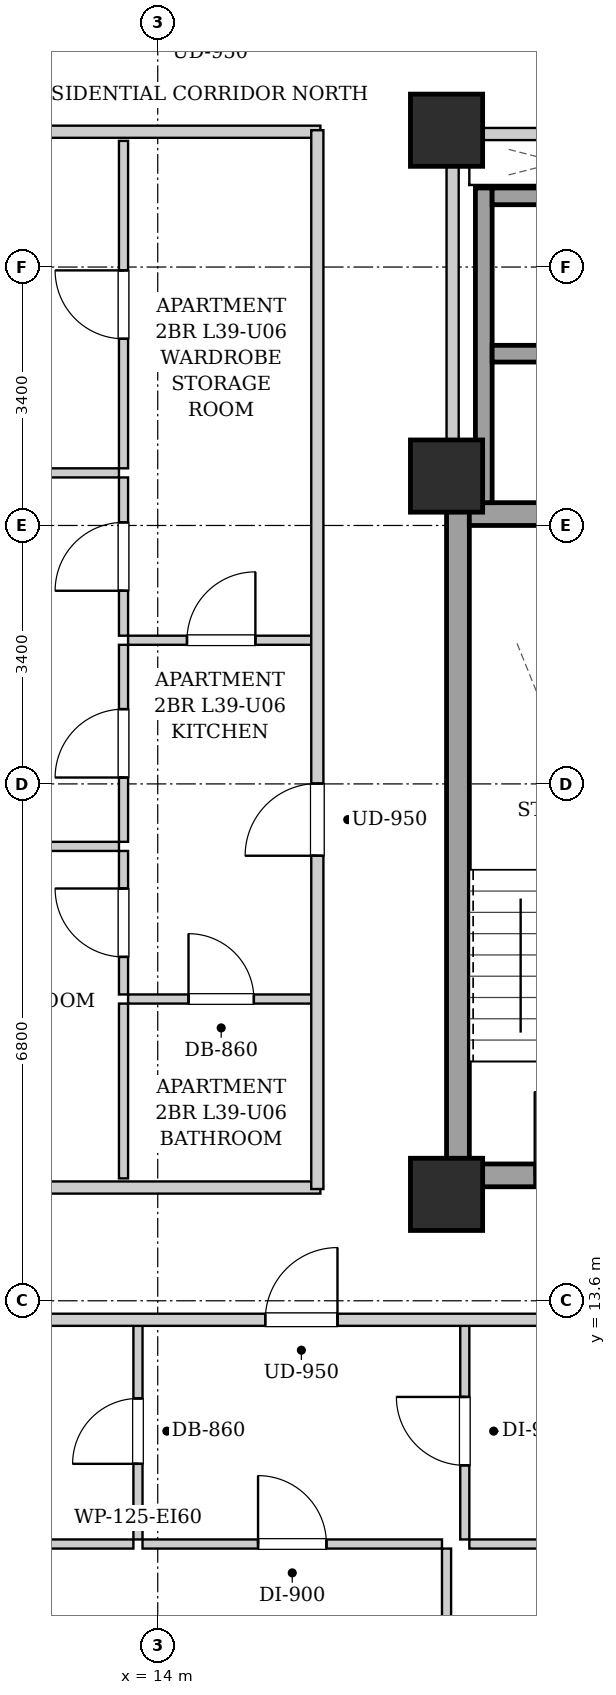
"""IFC4 building model, lengths in metres.
Left out: names, types, materials, properties, quantities, classifications, styles, units other than length and angle.
Written with IfcOpenShell. Run it as: python <this file> out.ifc"""

import sys

from ifc_helpers import new_model, si_unit, direction, frame, frame_2d, origin, origin_2d, place, context, subcontext, project, spatial, rectangle, extrude, element, fill, save


model = new_model("IFC4")
c1 = context("Model", 3, precision=1e-05, world=origin(), true_north=direction((0.0, 1.0)))
c2 = subcontext(c1, "Body", "Model", "MODEL_VIEW")
j1 = project(units=[si_unit("LENGTHUNIT", "METRE"), si_unit("PLANEANGLEUNIT", "RADIAN")], contexts=[c1])
p1 = place(None, origin())
s1 = spatial("IfcSite", under=j1, at=p1, CompositionType="ELEMENT")
p2 = place(p1, origin())
s2 = spatial("IfcBuilding", under=s1, at=p2, CompositionType="ELEMENT")
p3 = place(p2, frame((0.0, 0.0, 137.4)))
s3 = spatial("IfcBuildingStorey", under=s2, at=p3, CompositionType="ELEMENT", Elevation=137.4)
for number, where, z_axis, x_axis in (
    (1, (17.8, 15.0, 0.0), (0.0, 0.0, 1.0), (1.0, 0.0, 0.0)),
    (2, (17.8, 29.0, 0.0), (0.0, 0.0, 1.0), (1.0, 0.0, 0.0)),
    (3, (17.8, 24.45, 0.0), (0.0, 0.0, 1.0), (1.0, 0.0, 0.0)),
):
    element("IfcColumn", number, at=place(p3, frame(where, z_axis=z_axis, x_axis=x_axis)), inside=s3, PredefinedType="COLUMN", context=c2, shape_type="SweptSolid", body=[
        extrude(rectangle(XDim=0.95, YDim=0.95, at=origin_2d()), origin(), (0.0, 0.0, 1.0), 3.25),
    ])
p4 = place(p3, frame((17.95, 15.1, 0.0), z_axis=(0.0, 0.0, 1.0), x_axis=(0.0, 1.0, 0.0)))
e4 = element("IfcWall", 4, at=p4, inside=s3, PredefinedType="SHEAR", context=c2, shape_type="SweptSolid", body=[
    extrude(rectangle(XDim=9.0, YDim=0.3, at=frame_2d((4.5, 0.0))), origin(), (0.0, 0.0, 1.0), 2.99),
])
p5 = place(p3, frame((18.1, 23.95, 0.0), z_axis=(0.0, 0.0, 1.0), x_axis=(1.0, 0.0, 0.0)))
e5 = element("IfcWall", 5, at=p5, inside=s3, PredefinedType="SHEAR", context=c2, shape_type="SweptSolid", body=[
    extrude(rectangle(XDim=2.85, YDim=0.3, at=frame_2d((1.425, 0.0))), origin(), (0.0, 0.0, 1.0), 2.99),
])
p6 = place(p3, frame((18.1, 15.25, 0.0), z_axis=(0.0, 0.0, 1.0), x_axis=(1.0, 0.0, 0.0)))
e6 = element("IfcWall", 6, at=p6, inside=s3, PredefinedType="SHEAR", context=c2, shape_type="SweptSolid", body=[
    extrude(rectangle(XDim=2.85, YDim=0.3, at=frame_2d((1.425, 0.0))), origin(), (0.0, 0.0, 1.0), 2.99),
])
p7 = place(p6, frame((0.86, 0.0, 0.0)))
e7 = element("IfcOpeningElement", 7, at=p7, cuts=e6, PredefinedType="OPENING", context=c2, shape_type="SweptSolid", body=[
    extrude(rectangle(XDim=1.1, YDim=2.05, at=frame_2d((0.55, 1.025))), frame((0.0, 0.16, 0.0), z_axis=(0.0, -1.0, 0.0), x_axis=(1.0, 0.0, 0.0)), (0.0, 0.0, 1.0), 0.32),
])
p8 = place(p3, frame((18.29, 24.1, 0.0), z_axis=(0.0, 0.0, 1.0), x_axis=(0.0, 1.0, 0.0)))
e8 = element("IfcWall", 8, at=p8, inside=s3, PredefinedType="SHEAR", context=c2, shape_type="SweptSolid", body=[
    extrude(rectangle(XDim=4.14, YDim=0.22, at=frame_2d((2.07, 0.0))), origin(), (0.0, 0.0, 1.0), 2.99),
])
for number, where, z_axis, x_axis in (
    (9, (18.4, 26.06, 0.0), (0.0, 0.0, 1.0), (1.0, 0.0, 0.0)),
    (10, (18.4, 28.13, 0.0), (0.0, 0.0, 1.0), (1.0, 0.0, 0.0)),
):
    element("IfcWall", number, at=place(p3, frame(where, z_axis=z_axis, x_axis=x_axis)), inside=s3, PredefinedType="SHEAR", context=c2, shape_type="SweptSolid", body=[
        extrude(rectangle(XDim=1.9, YDim=0.22, at=frame_2d((0.95, 0.0))), origin(), (0.0, 0.0, 1.0), 2.99),
    ])
p9 = place(p3, frame((17.88, 24.12, 0.0), z_axis=(0.0, 0.0, 1.0), x_axis=(0.0, 1.0, 0.0)))
e11 = element("IfcWall", 11, at=p9, inside=s3, PredefinedType="PARTITIONING", context=c2, shape_type="SweptSolid", body=[
    extrude(rectangle(XDim=4.76, YDim=0.16, at=frame_2d((2.38, 0.0))), origin(), (0.0, 0.0, 1.0), 2.325),
])
p10 = place(p3, frame((17.96, 28.95, 0.0), z_axis=(0.0, 0.0, 1.0), x_axis=(1.0, 0.0, 0.0)))
e12 = element("IfcWall", 12, at=p10, inside=s3, PredefinedType="PARTITIONING", context=c2, shape_type="SweptSolid", body=[
    extrude(rectangle(XDim=4.29, YDim=0.16, at=frame_2d((2.145, 0.0))), origin(), (0.0, 0.0, 1.0), 2.426),
])
p11 = place(p10, frame((1.695, 0.0, 0.0)))
e13 = element("IfcOpeningElement", 13, at=p11, cuts=e12, PredefinedType="OPENING", context=c2, shape_type="SweptSolid", body=[
    extrude(rectangle(XDim=0.86, YDim=2.05, at=frame_2d((0.43, 1.025))), frame((0.0, 0.09, 0.0), z_axis=(0.0, -1.0, 0.0), x_axis=(1.0, 0.0, 0.0)), (0.0, 0.0, 1.0), 0.18),
])
for number, where, z_axis, x_axis in (
    (14, (7.78, 15.09, 0.0), (0.0, 0.0, 1.0), (1.0, 0.0, 0.0)),
    (15, (7.78, 28.98, 0.0), (0.0, 0.0, 1.0), (1.0, 0.0, 0.0)),
):
    element("IfcWall", number, at=place(p3, frame(where, z_axis=z_axis, x_axis=x_axis)), inside=s3, PredefinedType="PARTITIONING", context=c2, shape_type="SweptSolid", body=[
        extrude(rectangle(XDim=8.36, YDim=0.16, at=frame_2d((4.18, 0.0))), origin(), (0.0, 0.0, 1.0), 2.426),
    ])
p12 = place(p3, frame((13.74, 10.46, 0.0), z_axis=(0.0, 0.0, 1.0), x_axis=(0.0, 1.0, 0.0)))
e16 = element("IfcWall", 16, at=p12, inside=s3, PredefinedType="PARTITIONING", context=c2, shape_type="SweptSolid", body=[
    extrude(rectangle(XDim=2.85, YDim=0.12, at=frame_2d((1.425, 0.0))), origin(), (0.0, 0.0, 1.0), 2.99),
])
p13 = place(p12, frame((0.995, 0.0, 0.0)))
e17 = element("IfcOpeningElement", 17, at=p13, cuts=e16, PredefinedType="OPENING", context=c2, shape_type="SweptSolid", body=[
    extrude(rectangle(XDim=0.86, YDim=2.05, at=frame_2d((0.43, 1.025))), frame((0.0, 0.07, 0.0), z_axis=(0.0, -1.0, 0.0), x_axis=(1.0, 0.0, 0.0)), (0.0, 0.0, 1.0), 0.14),
])
p14 = place(p3, frame((11.28, 10.4, 0.0), z_axis=(0.0, 0.0, 1.0), x_axis=(1.0, 0.0, 0.0)))
e18 = element("IfcWall", 18, at=p14, inside=s3, PredefinedType="PARTITIONING", context=c2, shape_type="SweptSolid", body=[
    extrude(rectangle(XDim=2.4, YDim=0.12, at=frame_2d((1.2, 0.0))), origin(), (0.0, 0.0, 1.0), 2.99),
])
p15 = place(p3, frame((18.04, 10.46, 0.0), z_axis=(0.0, 0.0, 1.0), x_axis=(0.0, 1.0, 0.0)))
e19 = element("IfcWall", 19, at=p15, inside=s3, PredefinedType="PARTITIONING", context=c2, shape_type="SweptSolid", body=[
    extrude(rectangle(XDim=2.85, YDim=0.12, at=frame_2d((1.425, 0.0))), origin(), (0.0, 0.0, 1.0), 2.99),
])
p16 = place(p15, frame((0.975, 0.0, 0.0)))
e20 = element("IfcOpeningElement", 20, at=p16, cuts=e19, PredefinedType="OPENING", context=c2, shape_type="SweptSolid", body=[
    extrude(rectangle(XDim=0.9, YDim=2.05, at=frame_2d((0.45, 1.025))), frame((0.0, 0.07, 0.0), z_axis=(0.0, -1.0, 0.0), x_axis=(1.0, 0.0, 0.0)), (0.0, 0.0, 1.0), 0.14),
])
p17 = place(p3, frame((13.8, 10.4, 0.0), z_axis=(0.0, 0.0, 1.0), x_axis=(1.0, 0.0, 0.0)))
e21 = element("IfcWall", 21, at=p17, inside=s3, PredefinedType="PARTITIONING", context=c2, shape_type="SweptSolid", body=[
    extrude(rectangle(XDim=3.94, YDim=0.12, at=frame_2d((1.97, 0.0))), origin(), (0.0, 0.0, 1.0), 2.99),
])
p18 = place(p17, frame((1.52, 0.0, 0.0)))
e22 = element("IfcOpeningElement", 22, at=p18, cuts=e21, PredefinedType="OPENING", context=c2, shape_type="SweptSolid", body=[
    extrude(rectangle(XDim=0.9, YDim=2.05, at=frame_2d((0.45, 1.025))), frame((0.0, 0.07, 0.0), z_axis=(0.0, -1.0, 0.0), x_axis=(1.0, 0.0, 0.0)), (0.0, 0.0, 1.0), 0.14),
])
p19 = place(p3, frame((18.1, 10.4, 0.0), z_axis=(0.0, 0.0, 1.0), x_axis=(1.0, 0.0, 0.0)))
e23 = element("IfcWall", 23, at=p19, inside=s3, PredefinedType="PARTITIONING", context=c2, shape_type="SweptSolid", body=[
    extrude(rectangle(XDim=3.708, YDim=0.12, at=frame_2d((1.854, 0.0))), origin(), (0.0, 0.0, 1.0), 2.99),
])
p20 = place(p19, frame((1.404, 0.0, 0.0)))
e24 = element("IfcOpeningElement", 24, at=p20, cuts=e23, PredefinedType="OPENING", context=c2, shape_type="SweptSolid", body=[
    extrude(rectangle(XDim=0.9, YDim=2.05, at=frame_2d((0.45, 1.025))), frame((0.0, 0.07, 0.0), z_axis=(0.0, -1.0, 0.0), x_axis=(1.0, 0.0, 0.0)), (0.0, 0.0, 1.0), 0.14),
])
p21 = place(p3, frame((17.8, 4.08, 0.0), z_axis=(0.0, 0.0, 1.0), x_axis=(0.0, 1.0, 0.0)))
e25 = element("IfcWall", 25, at=p21, inside=s3, PredefinedType="PARTITIONING", context=c2, shape_type="SweptSolid", body=[
    extrude(rectangle(XDim=6.26, YDim=0.12, at=frame_2d((3.13, 0.0))), origin(), (0.0, 0.0, 1.0), 2.426),
])
p22 = place(p21, frame((2.665, 0.0, 0.0)))
e26 = element("IfcOpeningElement", 26, at=p22, cuts=e25, PredefinedType="OPENING", context=c2, shape_type="SweptSolid", body=[
    extrude(rectangle(XDim=0.9, YDim=2.05, at=frame_2d((0.45, 1.025))), frame((0.0, 0.07, 0.0), z_axis=(0.0, -1.0, 0.0), x_axis=(1.0, 0.0, 0.0)), (0.0, 0.0, 1.0), 0.14),
])
p23 = place(p3, frame((13.61, 22.29, 0.0), z_axis=(0.0, 0.0, 1.0), x_axis=(1.0, 0.0, 0.0)))
e27 = element("IfcWall", 27, at=p23, inside=s3, PredefinedType="PARTITIONING", context=c2, shape_type="SweptSolid", body=[
    extrude(rectangle(XDim=2.45, YDim=0.12, at=frame_2d((1.225, 0.0))), origin(), (0.0, 0.0, 1.0), 2.99),
])
p24 = place(p23, frame((0.775, 0.0, 0.0)))
e28 = element("IfcOpeningElement", 28, at=p24, cuts=e27, PredefinedType="OPENING", context=c2, shape_type="SweptSolid", body=[
    extrude(rectangle(XDim=0.9, YDim=2.05, at=frame_2d((0.45, 1.025))), frame((0.0, 0.07, 0.0), z_axis=(0.0, -1.0, 0.0), x_axis=(1.0, 0.0, 0.0)), (0.0, 0.0, 1.0), 0.14),
])
p25 = place(p3, frame((13.55, 22.35, 0.0), z_axis=(0.0, 0.0, 1.0), x_axis=(0.0, 1.0, 0.0)))
e29 = element("IfcWall", 29, at=p25, inside=s3, PredefinedType="PARTITIONING", context=c2, shape_type="SweptSolid", body=[
    extrude(rectangle(XDim=2.082, YDim=0.12, at=frame_2d((1.041, 0.0))), origin(), (0.0, 0.0, 1.0), 2.99),
])
p26 = place(p25, frame((0.591, 0.0, 0.0)))
e30 = element("IfcOpeningElement", 30, at=p26, cuts=e29, PredefinedType="OPENING", context=c2, shape_type="SweptSolid", body=[
    extrude(rectangle(XDim=0.9, YDim=2.05, at=frame_2d((0.45, 1.025))), frame((0.0, 0.07, 0.0), z_axis=(0.0, -1.0, 0.0), x_axis=(1.0, 0.0, 0.0)), (0.0, 0.0, 1.0), 0.14),
])
p27 = place(p3, frame((13.55, 24.552, 0.0), z_axis=(0.0, 0.0, 1.0), x_axis=(0.0, 1.0, 0.0)))
e31 = element("IfcWall", 31, at=p27, inside=s3, PredefinedType="PARTITIONING", context=c2, shape_type="SweptSolid", body=[
    extrude(rectangle(XDim=4.308, YDim=0.12, at=frame_2d((2.154, 0.0))), origin(), (0.0, 0.0, 1.0), 2.99),
])
p28 = place(p27, frame((1.704, 0.0, 0.0)))
e32 = element("IfcOpeningElement", 32, at=p28, cuts=e31, PredefinedType="OPENING", context=c2, shape_type="SweptSolid", body=[
    extrude(rectangle(XDim=0.9, YDim=2.05, at=frame_2d((0.45, 1.025))), frame((0.0, 0.07, 0.0), z_axis=(0.0, -1.0, 0.0), x_axis=(1.0, 0.0, 0.0)), (0.0, 0.0, 1.0), 0.14),
])
p29 = place(p3, frame((13.61, 17.57, 0.0), z_axis=(0.0, 0.0, 1.0), x_axis=(1.0, 0.0, 0.0)))
e33 = element("IfcWall", 33, at=p29, inside=s3, PredefinedType="PARTITIONING", context=c2, shape_type="SweptSolid", body=[
    extrude(rectangle(XDim=2.45, YDim=0.12, at=frame_2d((1.225, 0.0))), origin(), (0.0, 0.0, 1.0), 2.99),
])
p30 = place(p29, frame((0.795, 0.0, 0.0)))
e34 = element("IfcOpeningElement", 34, at=p30, cuts=e33, PredefinedType="OPENING", context=c2, shape_type="SweptSolid", body=[
    extrude(rectangle(XDim=0.86, YDim=2.05, at=frame_2d((0.43, 1.025))), frame((0.0, 0.07, 0.0), z_axis=(0.0, -1.0, 0.0), x_axis=(1.0, 0.0, 0.0)), (0.0, 0.0, 1.0), 0.14),
])
p31 = place(p3, frame((13.55, 15.21, 0.0), z_axis=(0.0, 0.0, 1.0), x_axis=(0.0, 1.0, 0.0)))
e35 = element("IfcWall", 35, at=p31, inside=s3, PredefinedType="PARTITIONING", context=c2, shape_type="SweptSolid", body=[
    extrude(rectangle(XDim=2.3, YDim=0.12, at=frame_2d((1.15, 0.0))), origin(), (0.0, 0.0, 1.0), 2.99),
])
p32 = place(p3, frame((13.55, 17.63, 0.0), z_axis=(0.0, 0.0, 1.0), x_axis=(0.0, 1.0, 0.0)))
e36 = element("IfcWall", 36, at=p32, inside=s3, PredefinedType="PARTITIONING", context=c2, shape_type="SweptSolid", body=[
    extrude(rectangle(XDim=1.888, YDim=0.12, at=frame_2d((0.944, 0.0))), origin(), (0.0, 0.0, 1.0), 2.99),
])
p33 = place(p32, frame((0.494, 0.0, 0.0)))
e37 = element("IfcOpeningElement", 37, at=p33, cuts=e36, PredefinedType="OPENING", context=c2, shape_type="SweptSolid", body=[
    extrude(rectangle(XDim=0.9, YDim=2.05, at=frame_2d((0.45, 1.025))), frame((0.0, 0.07, 0.0), z_axis=(0.0, -1.0, 0.0), x_axis=(1.0, 0.0, 0.0)), (0.0, 0.0, 1.0), 0.14),
])
p34 = place(p3, frame((13.55, 19.638, 0.0), z_axis=(0.0, 0.0, 1.0), x_axis=(0.0, 1.0, 0.0)))
e38 = element("IfcWall", 38, at=p34, inside=s3, PredefinedType="PARTITIONING", context=c2, shape_type="SweptSolid", body=[
    extrude(rectangle(XDim=2.592, YDim=0.12, at=frame_2d((1.296, 0.0))), origin(), (0.0, 0.0, 1.0), 2.99),
])
p35 = place(p34, frame((0.846, 0.0, 0.0)))
e39 = element("IfcOpeningElement", 39, at=p35, cuts=e38, PredefinedType="OPENING", context=c2, shape_type="SweptSolid", body=[
    extrude(rectangle(XDim=0.9, YDim=2.05, at=frame_2d((0.45, 1.025))), frame((0.0, 0.07, 0.0), z_axis=(0.0, -1.0, 0.0), x_axis=(1.0, 0.0, 0.0)), (0.0, 0.0, 1.0), 0.14),
])
p36 = place(p3, frame((7.78, 19.578, 0.0), z_axis=(0.0, 0.0, 1.0), x_axis=(1.0, 0.0, 0.0)))
e40 = element("IfcWall", 40, at=p36, inside=s3, PredefinedType="PARTITIONING", context=c2, shape_type="SweptSolid", body=[
    extrude(rectangle(XDim=5.71, YDim=0.12, at=frame_2d((2.855, 0.0))), origin(), (0.0, 0.0, 1.0), 2.99),
])
p37 = place(p36, frame((2.39, 0.0, 0.0)))
e41 = element("IfcOpeningElement", 41, at=p37, cuts=e40, PredefinedType="OPENING", context=c2, shape_type="SweptSolid", body=[
    extrude(rectangle(XDim=0.9, YDim=2.05, at=frame_2d((0.45, 1.025))), frame((0.0, 0.07, 0.0), z_axis=(0.0, -1.0, 0.0), x_axis=(1.0, 0.0, 0.0)), (0.0, 0.0, 1.0), 0.14),
])
p38 = place(p3, frame((7.78, 24.492, 0.0), z_axis=(0.0, 0.0, 1.0), x_axis=(1.0, 0.0, 0.0)))
e42 = element("IfcWall", 42, at=p38, inside=s3, PredefinedType="PARTITIONING", context=c2, shape_type="SweptSolid", body=[
    extrude(rectangle(XDim=5.71, YDim=0.12, at=frame_2d((2.855, 0.0))), origin(), (0.0, 0.0, 1.0), 2.621),
])
p39 = place(p38, frame((2.39, 0.0, 0.0)))
e43 = element("IfcOpeningElement", 43, at=p39, cuts=e42, PredefinedType="OPENING", context=c2, shape_type="SweptSolid", body=[
    extrude(rectangle(XDim=0.9, YDim=2.05, at=frame_2d((0.45, 1.025))), frame((0.0, 0.07, 0.0), z_axis=(0.0, -1.0, 0.0), x_axis=(1.0, 0.0, 0.0)), (0.0, 0.0, 1.0), 0.14),
])
p40 = place(p3, frame((10.05, 13.35, 0.0), z_axis=(0.0, 0.0, 1.0), x_axis=(1.0, 0.0, 0.0)))
e44 = element("IfcWall", 44, at=p40, inside=s3, PredefinedType="PARTITIONING", context=c2, shape_type="SweptSolid", body=[
    extrude(rectangle(XDim=27.7, YDim=0.16, at=frame_2d((13.85, 0.0))), origin(), (0.0, 0.0, 1.0), 2.99),
])
p41 = place(p40, frame((5.365, 0.0, 0.0)))
e45 = element("IfcOpeningElement", 45, at=p41, cuts=e44, PredefinedType="OPENING", context=c2, shape_type="SweptSolid", body=[
    extrude(rectangle(XDim=0.95, YDim=2.1, at=frame_2d((0.475, 1.05))), frame((0.0, 0.09, 0.0), z_axis=(0.0, -1.0, 0.0), x_axis=(1.0, 0.0, 0.0)), (0.0, 0.0, 1.0), 0.18),
])
p42 = place(p40, frame((15.365, 0.0, 0.0)))
e46 = element("IfcOpeningElement", 46, at=p42, cuts=e44, PredefinedType="OPENING", context=c2, shape_type="SweptSolid", body=[
    extrude(rectangle(XDim=0.95, YDim=2.1, at=frame_2d((0.475, 1.05))), frame((0.0, 0.09, 0.0), z_axis=(0.0, -1.0, 0.0), x_axis=(1.0, 0.0, 0.0)), (0.0, 0.0, 1.0), 0.18),
])
p43 = place(p40, frame((21.565, 0.0, 0.0)))
e47 = element("IfcOpeningElement", 47, at=p43, cuts=e44, PredefinedType="OPENING", context=c2, shape_type="SweptSolid", body=[
    extrude(rectangle(XDim=0.95, YDim=2.1, at=frame_2d((0.475, 1.05))), frame((0.0, 0.09, 0.0), z_axis=(0.0, -1.0, 0.0), x_axis=(1.0, 0.0, 0.0)), (0.0, 0.0, 1.0), 0.18),
])
p44 = place(p3, frame((16.1, 15.07, 0.0), z_axis=(0.0, 0.0, 1.0), x_axis=(0.0, 1.0, 0.0)))
e48 = element("IfcWall", 48, at=p44, inside=s3, PredefinedType="PARTITIONING", context=c2, shape_type="SweptSolid", body=[
    extrude(rectangle(XDim=13.93, YDim=0.16, at=frame_2d((6.965, 0.0))), origin(), (0.0, 0.0, 1.0), 2.99),
])
p45 = place(p44, frame((4.385, 0.0, 0.0)))
e49 = element("IfcOpeningElement", 49, at=p45, cuts=e48, PredefinedType="OPENING", context=c2, shape_type="SweptSolid", body=[
    extrude(rectangle(XDim=0.95, YDim=2.1, at=frame_2d((0.475, 1.05))), frame((0.0, 0.09, 0.0), z_axis=(0.0, -1.0, 0.0), x_axis=(1.0, 0.0, 0.0)), (0.0, 0.0, 1.0), 0.18),
])
p46 = place(p7, origin())
e50 = element("IfcDoor", 50, at=p46, inside=s3, OperationType="SINGLE_SWING_LEFT", PredefinedType="DOOR", context=c2, shape_type="SweptSolid", body=[
    extrude(rectangle(XDim=1.1, YDim=2.05, at=frame_2d((0.55, 1.025))), frame((0.0, 0.025, 0.0), z_axis=(0.0, -1.0, 0.0), x_axis=(1.0, 0.0, 0.0)), (0.0, 0.0, 1.0), 0.05),
])
fill(e7, e50)
p47 = place(p13, origin())
e51 = element("IfcDoor", 51, at=p47, inside=s3, OperationType="SINGLE_SWING_LEFT", PredefinedType="DOOR", context=c2, shape_type="SweptSolid", body=[
    extrude(rectangle(XDim=0.86, YDim=2.05, at=frame_2d((0.43, 1.025))), frame((0.0, 0.025, 0.0), z_axis=(0.0, -1.0, 0.0), x_axis=(1.0, 0.0, 0.0)), (0.0, 0.0, 1.0), 0.05),
])
fill(e17, e51)
p48 = place(p16, origin())
e52 = element("IfcDoor", 52, at=p48, inside=s3, OperationType="SINGLE_SWING_RIGHT", PredefinedType="DOOR", context=c2, shape_type="SweptSolid", body=[
    extrude(rectangle(XDim=0.9, YDim=2.05, at=frame_2d((0.45, 1.025))), frame((0.0, 0.025, 0.0), z_axis=(0.0, -1.0, 0.0), x_axis=(1.0, 0.0, 0.0)), (0.0, 0.0, 1.0), 0.05),
])
fill(e20, e52)
p49 = place(p18, origin())
e53 = element("IfcDoor", 53, at=p49, inside=s3, OperationType="SINGLE_SWING_LEFT", PredefinedType="DOOR", context=c2, shape_type="SweptSolid", body=[
    extrude(rectangle(XDim=0.9, YDim=2.05, at=frame_2d((0.45, 1.025))), frame((0.0, 0.025, 0.0), z_axis=(0.0, -1.0, 0.0), x_axis=(1.0, 0.0, 0.0)), (0.0, 0.0, 1.0), 0.05),
])
fill(e22, e53)
p50 = place(p24, origin())
e54 = element("IfcDoor", 54, at=p50, inside=s3, OperationType="SINGLE_SWING_RIGHT", PredefinedType="DOOR", context=c2, shape_type="SweptSolid", body=[
    extrude(rectangle(XDim=0.9, YDim=2.05, at=frame_2d((0.45, 1.025))), frame((0.0, 0.025, 0.0), z_axis=(0.0, -1.0, 0.0), x_axis=(1.0, 0.0, 0.0)), (0.0, 0.0, 1.0), 0.05),
])
fill(e28, e54)
p51 = place(p26, origin())
e55 = element("IfcDoor", 55, at=p51, inside=s3, OperationType="SINGLE_SWING_LEFT", PredefinedType="DOOR", context=c2, shape_type="SweptSolid", body=[
    extrude(rectangle(XDim=0.9, YDim=2.05, at=frame_2d((0.45, 1.025))), frame((0.0, 0.025, 0.0), z_axis=(0.0, -1.0, 0.0), x_axis=(1.0, 0.0, 0.0)), (0.0, 0.0, 1.0), 0.05),
])
fill(e30, e55)
p52 = place(p28, origin())
e56 = element("IfcDoor", 56, at=p52, inside=s3, OperationType="SINGLE_SWING_RIGHT", PredefinedType="DOOR", context=c2, shape_type="SweptSolid", body=[
    extrude(rectangle(XDim=0.9, YDim=2.05, at=frame_2d((0.45, 1.025))), frame((0.0, 0.025, 0.0), z_axis=(0.0, -1.0, 0.0), x_axis=(1.0, 0.0, 0.0)), (0.0, 0.0, 1.0), 0.05),
])
fill(e32, e56)
p53 = place(p30, origin())
e57 = element("IfcDoor", 57, at=p53, inside=s3, OperationType="SINGLE_SWING_LEFT", PredefinedType="DOOR", context=c2, shape_type="SweptSolid", body=[
    extrude(rectangle(XDim=0.86, YDim=2.05, at=frame_2d((0.43, 1.025))), frame((0.0, 0.025, 0.0), z_axis=(0.0, -1.0, 0.0), x_axis=(1.0, 0.0, 0.0)), (0.0, 0.0, 1.0), 0.05),
])
fill(e34, e57)
p54 = place(p33, origin())
e58 = element("IfcDoor", 58, at=p54, inside=s3, OperationType="SINGLE_SWING_RIGHT", PredefinedType="DOOR", context=c2, shape_type="SweptSolid", body=[
    extrude(rectangle(XDim=0.9, YDim=2.05, at=frame_2d((0.45, 1.025))), frame((0.0, 0.025, 0.0), z_axis=(0.0, -1.0, 0.0), x_axis=(1.0, 0.0, 0.0)), (0.0, 0.0, 1.0), 0.05),
])
fill(e37, e58)
p55 = place(p35, origin())
e59 = element("IfcDoor", 59, at=p55, inside=s3, OperationType="SINGLE_SWING_LEFT", PredefinedType="DOOR", context=c2, shape_type="SweptSolid", body=[
    extrude(rectangle(XDim=0.9, YDim=2.05, at=frame_2d((0.45, 1.025))), frame((0.0, 0.025, 0.0), z_axis=(0.0, -1.0, 0.0), x_axis=(1.0, 0.0, 0.0)), (0.0, 0.0, 1.0), 0.05),
])
fill(e39, e59)
p56 = place(p41, origin())
e60 = element("IfcDoor", 60, at=p56, inside=s3, OperationType="SINGLE_SWING_RIGHT", PredefinedType="DOOR", context=c2, shape_type="SweptSolid", body=[
    extrude(rectangle(XDim=0.95, YDim=2.1, at=frame_2d((0.475, 1.05))), frame((0.0, 0.025, 0.0), z_axis=(0.0, -1.0, 0.0), x_axis=(1.0, 0.0, 0.0)), (0.0, 0.0, 1.0), 0.05),
])
fill(e45, e60)
p57 = place(p45, origin())
e61 = element("IfcDoor", 61, at=p57, inside=s3, OperationType="SINGLE_SWING_LEFT", PredefinedType="DOOR", context=c2, shape_type="SweptSolid", body=[
    extrude(rectangle(XDim=0.95, YDim=2.1, at=frame_2d((0.475, 1.05))), frame((0.0, 0.025, 0.0), z_axis=(0.0, -1.0, 0.0), x_axis=(1.0, 0.0, 0.0)), (0.0, 0.0, 1.0), 0.05),
])
fill(e49, e61)
save(model, sys.argv[1])
